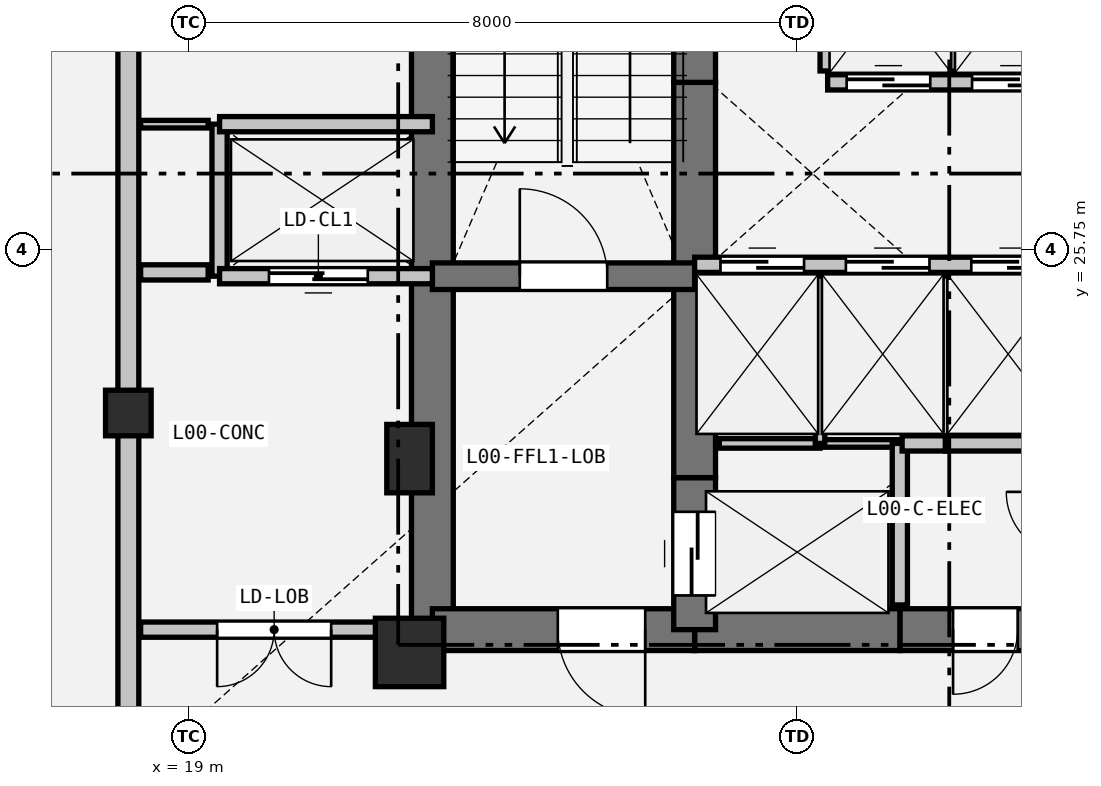
"""IFC4 building model, lengths in metres.
Left out: names, types, materials, properties, quantities, classifications, styles, units other than length and angle.
Written with IfcOpenShell. Run it as: python <this file> out.ifc"""

import sys

from ifc_helpers import new_model, si_unit, direction, frame, frame_2d, origin, origin_2d, place, context, subcontext, project, spatial, rectangle, extrude, element, fill, save


model = new_model("IFC4")
c1 = context("Model", 3, precision=1e-05, world=origin(), true_north=direction((0.0, 1.0)))
c2 = subcontext(c1, "Body", "Model", "MODEL_VIEW")
j1 = project(units=[si_unit("LENGTHUNIT", "METRE"), si_unit("PLANEANGLEUNIT", "RADIAN")], contexts=[c1])
p1 = place(None, origin())
s1 = spatial("IfcSite", under=j1, at=p1, CompositionType="ELEMENT")
p2 = place(p1, origin())
s2 = spatial("IfcBuilding", under=s1, at=p2, CompositionType="ELEMENT")
p3 = place(p2, origin())
s3 = spatial("IfcBuildingStorey", under=s2, at=p3, CompositionType="ELEMENT", Elevation=0.0)
p4 = place(p3, frame((18.2, 23.6, 0.0), z_axis=(0.0, 0.0, 1.0), x_axis=(1.0, 0.0, 0.0)))
e1 = element("IfcColumn", 1, at=p4, inside=s3, PredefinedType="COLUMN", context=c2, shape_type="SweptSolid", body=[
    extrude(rectangle(XDim=0.6, YDim=0.6, at=origin_2d()), origin(), (0.0, 0.0, 1.0), 5.1),
])
p5 = place(p3, frame((21.9, 20.45, 0.0), z_axis=(0.0, 0.0, 1.0), x_axis=(1.0, 0.0, 0.0)))
e2 = element("IfcColumn", 2, at=p5, inside=s3, PredefinedType="COLUMN", context=c2, shape_type="SweptSolid", body=[
    extrude(rectangle(XDim=0.9, YDim=0.9, at=origin_2d()), origin(), (0.0, 0.0, 1.0), 5.1),
])
p6 = place(p3, frame((21.9, 23.0, 0.0), z_axis=(0.0, 0.0, 1.0), x_axis=(1.0, 0.0, 0.0)))
e3 = element("IfcColumn", 3, at=p6, inside=s3, PredefinedType="PILASTER", context=c2, shape_type="SweptSolid", body=[
    extrude(rectangle(XDim=0.6, YDim=0.9, at=origin_2d()), origin(), (0.0, 0.0, 1.0), 5.1),
])
p7 = place(p3, frame((18.2, 18.8, 0.0), z_axis=(0.0, 0.0, 1.0), x_axis=(0.0, 1.0, 0.0)))
e4 = element("IfcWall", 4, at=p7, inside=s3, PredefinedType="SOLIDWALL", context=c2, shape_type="SweptSolid", body=[
    extrude(rectangle(XDim=15.9, YDim=0.275, at=frame_2d((7.95, 0.0))), origin(), (0.0, 0.0, 1.0), 3.185),
])
p8 = place(p7, frame((10.5, 0.0, 0.0)))
e5 = element("IfcOpeningElement", 5, at=p8, cuts=e4, PredefinedType="OPENING", context=c2, shape_type="SweptSolid", body=[
    extrude(rectangle(XDim=1.2, YDim=2.2, at=frame_2d((0.6, 1.1))), frame((0.0, 0.147, 0.0), z_axis=(0.0, -1.0, 0.0), x_axis=(1.0, 0.0, 0.0)), (0.0, 0.0, 1.0), 0.295),
])
p9 = place(p3, frame((22.2, 20.75, 0.0), z_axis=(0.0, 0.0, 1.0), x_axis=(0.0, 1.0, 0.0)))
e6 = element("IfcWall", 6, at=p9, inside=s3, PredefinedType="SHEAR", context=c2, shape_type="SweptSolid", body=[
    extrude(rectangle(XDim=4.65, YDim=0.55, at=frame_2d((2.325, 0.0))), origin(), (0.0, 0.0, 1.0), 4.8),
])
p10 = place(p3, frame((22.2, 25.4, 0.0), z_axis=(0.0, 0.0, 1.0), x_axis=(0.0, 1.0, 0.0)))
e7 = element("IfcWall", 7, at=p10, inside=s3, PredefinedType="SHEAR", context=c2, shape_type="SweptSolid", body=[
    extrude(rectangle(XDim=7.35, YDim=0.55, at=frame_2d((3.675, 0.0))), origin(), (0.0, 0.0, 1.0), 4.8),
])
p11 = place(p3, frame((30.6, 20.75, 0.0), z_axis=(0.0, 0.0, 1.0), x_axis=(-1.0, 0.0, 0.0)))
e8 = element("IfcWall", 8, at=p11, inside=s3, PredefinedType="SHEAR", context=c2, shape_type="SweptSolid", body=[
    extrude(rectangle(XDim=2.25, YDim=0.55, at=frame_2d((1.125, 0.0))), origin(), (0.0, 0.0, 1.0), 4.8),
])
p12 = place(p11, frame((0.7, 0.0, 0.0)))
e9 = element("IfcOpeningElement", 9, at=p12, cuts=e8, PredefinedType="OPENING", context=c2, shape_type="SweptSolid", body=[
    extrude(rectangle(XDim=0.85, YDim=2.1, at=frame_2d((0.425, 1.05))), frame((0.0, 0.285, 0.0), z_axis=(0.0, -1.0, 0.0), x_axis=(1.0, 0.0, 0.0)), (0.0, 0.0, 1.0), 0.57),
])
p13 = place(p3, frame((28.35, 20.75, 0.0), z_axis=(0.0, 0.0, 1.0), x_axis=(-1.0, 0.0, 0.0)))
e10 = element("IfcWall", 10, at=p13, inside=s3, PredefinedType="SHEAR", context=c2, shape_type="SweptSolid", body=[
    extrude(rectangle(XDim=2.7, YDim=0.55, at=frame_2d((1.35, 0.0))), origin(), (0.0, 0.0, 1.0), 4.8),
])
p14 = place(p3, frame((25.65, 20.75, 0.0), z_axis=(0.0, 0.0, 1.0), x_axis=(-1.0, 0.0, 0.0)))
e11 = element("IfcWall", 11, at=p14, inside=s3, PredefinedType="SHEAR", context=c2, shape_type="SweptSolid", body=[
    extrude(rectangle(XDim=3.45, YDim=0.55, at=frame_2d((1.725, 0.0))), origin(), (0.0, 0.0, 1.0), 4.8),
])
p15 = place(p14, frame((0.65, 0.0, 0.0)))
e12 = element("IfcOpeningElement", 12, at=p15, cuts=e11, PredefinedType="OPENING", context=c2, shape_type="SweptSolid", body=[
    extrude(rectangle(XDim=1.15, YDim=2.15, at=frame_2d((0.575, 1.075))), frame((0.0, 0.285, 0.0), z_axis=(0.0, -1.0, 0.0), x_axis=(1.0, 0.0, 0.0)), (0.0, 0.0, 1.0), 0.57),
])
p16 = place(p3, frame((25.65, 20.75, 0.0), z_axis=(0.0, 0.0, 1.0), x_axis=(0.0, 1.0, 0.0)))
e13 = element("IfcWall", 13, at=p16, inside=s3, PredefinedType="SHEAR", context=c2, shape_type="SweptSolid", body=[
    extrude(rectangle(XDim=2.0, YDim=0.55, at=frame_2d((1.0, 0.0))), origin(), (0.0, 0.0, 1.0), 4.8),
])
p17 = place(p16, frame((0.45, 0.0, 0.0)))
e14 = element("IfcOpeningElement", 14, at=p17, cuts=e13, PredefinedType="OPENING", context=c2, shape_type="SweptSolid", body=[
    extrude(rectangle(XDim=1.1, YDim=2.15, at=frame_2d((0.55, 1.075))), frame((0.0, 0.285, 0.0), z_axis=(0.0, -1.0, 0.0), x_axis=(1.0, 0.0, 0.0)), (0.0, 0.0, 1.0), 0.57),
])
p18 = place(p3, frame((25.65, 22.75, 0.0), z_axis=(0.0, 0.0, 1.0), x_axis=(0.0, 1.0, 0.0)))
e15 = element("IfcWall", 15, at=p18, inside=s3, PredefinedType="SHEAR", context=c2, shape_type="SweptSolid", body=[
    extrude(rectangle(XDim=2.8, YDim=0.55, at=frame_2d((1.4, 0.0))), origin(), (0.0, 0.0, 1.0), 4.8),
])
p19 = place(p3, frame((25.65, 25.55, 0.0), z_axis=(0.0, 0.0, 1.0), x_axis=(0.0, 1.0, 0.0)))
e16 = element("IfcWall", 16, at=p19, inside=s3, PredefinedType="SHEAR", context=c2, shape_type="SweptSolid", body=[
    extrude(rectangle(XDim=2.4, YDim=0.55, at=frame_2d((1.2, 0.0))), origin(), (0.0, 0.0, 1.0), 4.8),
])
p20 = place(p3, frame((25.65, 27.95, 0.0), z_axis=(0.0, 0.0, 1.0), x_axis=(0.0, 1.0, 0.0)))
e17 = element("IfcWall", 17, at=p20, inside=s3, PredefinedType="SHEAR", context=c2, shape_type="SweptSolid", body=[
    extrude(rectangle(XDim=4.8, YDim=0.55, at=frame_2d((2.4, 0.0))), origin(), (0.0, 0.0, 1.0), 4.8),
])
p21 = place(p3, frame((22.2, 25.4, 0.0), z_axis=(0.0, 0.0, 1.0), x_axis=(1.0, 0.0, 0.0)))
e18 = element("IfcWall", 18, at=p21, inside=s3, PredefinedType="SHEAR", context=c2, shape_type="SweptSolid", body=[
    extrude(rectangle(XDim=3.45, YDim=0.35, at=frame_2d((1.725, 0.0))), origin(), (0.0, 0.0, 1.0), 4.8),
])
p22 = place(p21, frame((1.15, 0.0, 0.0)))
e19 = element("IfcOpeningElement", 19, at=p22, cuts=e18, PredefinedType="OPENING", context=c2, shape_type="SweptSolid", body=[
    extrude(rectangle(XDim=1.15, YDim=2.15, at=frame_2d((0.575, 1.075))), frame((0.0, 0.185, 0.0), z_axis=(0.0, -1.0, 0.0), x_axis=(1.0, 0.0, 0.0)), (0.0, 0.0, 1.0), 0.37),
])
p23 = place(p3, frame((25.65, 25.55, 0.0), z_axis=(0.0, 0.0, 1.0), x_axis=(1.0, 0.0, 0.0)))
e20 = element("IfcWall", 20, at=p23, inside=s3, PredefinedType="PARTITIONING", context=c2, shape_type="SweptSolid", body=[
    extrude(rectangle(XDim=4.95, YDim=0.2, at=frame_2d((2.475, 0.0))), origin(), (0.0, 0.0, 1.0), 4.8),
])
p24 = place(p23, frame((0.34, 0.0, 0.0)))
e21 = element("IfcOpeningElement", 21, at=p24, cuts=e20, PredefinedType="OPENING", context=c2, shape_type="SweptSolid", body=[
    extrude(rectangle(XDim=1.1, YDim=2.15, at=frame_2d((0.55, 1.075))), frame((0.0, 0.11, 0.0), z_axis=(0.0, -1.0, 0.0), x_axis=(1.0, 0.0, 0.0)), (0.0, 0.0, 1.0), 0.22),
])
p25 = place(p23, frame((1.99, 0.0, 0.0)))
e22 = element("IfcOpeningElement", 22, at=p25, cuts=e20, PredefinedType="OPENING", context=c2, shape_type="SweptSolid", body=[
    extrude(rectangle(XDim=1.1, YDim=2.15, at=frame_2d((0.55, 1.075))), frame((0.0, 0.11, 0.0), z_axis=(0.0, -1.0, 0.0), x_axis=(1.0, 0.0, 0.0)), (0.0, 0.0, 1.0), 0.22),
])
p26 = place(p23, frame((3.64, 0.0, 0.0)))
e23 = element("IfcOpeningElement", 23, at=p26, cuts=e20, PredefinedType="OPENING", context=c2, shape_type="SweptSolid", body=[
    extrude(rectangle(XDim=1.1, YDim=2.15, at=frame_2d((0.55, 1.075))), frame((0.0, 0.11, 0.0), z_axis=(0.0, -1.0, 0.0), x_axis=(1.0, 0.0, 0.0)), (0.0, 0.0, 1.0), 0.22),
])
p27 = place(p3, frame((27.4, 27.95, 0.0), z_axis=(0.0, 0.0, 1.0), x_axis=(1.0, 0.0, 0.0)))
e24 = element("IfcWall", 24, at=p27, inside=s3, PredefinedType="PARTITIONING", context=c2, shape_type="SweptSolid", body=[
    extrude(rectangle(XDim=4.95, YDim=0.2, at=frame_2d((2.475, 0.0))), origin(), (0.0, 0.0, 1.0), 4.8),
])
p28 = place(p27, frame((0.25, 0.0, 0.0)))
e25 = element("IfcOpeningElement", 25, at=p28, cuts=e24, PredefinedType="OPENING", context=c2, shape_type="SweptSolid", body=[
    extrude(rectangle(XDim=1.1, YDim=2.15, at=frame_2d((0.55, 1.075))), frame((0.0, 0.11, 0.0), z_axis=(0.0, -1.0, 0.0), x_axis=(1.0, 0.0, 0.0)), (0.0, 0.0, 1.0), 0.22),
])
p29 = place(p27, frame((1.9, 0.0, 0.0)))
e26 = element("IfcOpeningElement", 26, at=p29, cuts=e24, PredefinedType="OPENING", context=c2, shape_type="SweptSolid", body=[
    extrude(rectangle(XDim=1.1, YDim=2.15, at=frame_2d((0.55, 1.075))), frame((0.0, 0.11, 0.0), z_axis=(0.0, -1.0, 0.0), x_axis=(1.0, 0.0, 0.0)), (0.0, 0.0, 1.0), 0.22),
])
p30 = place(p27, frame((3.55, 0.0, 0.0)))
e27 = element("IfcOpeningElement", 27, at=p30, cuts=e24, PredefinedType="OPENING", context=c2, shape_type="SweptSolid", body=[
    extrude(rectangle(XDim=1.1, YDim=2.15, at=frame_2d((0.55, 1.075))), frame((0.0, 0.11, 0.0), z_axis=(0.0, -1.0, 0.0), x_axis=(1.0, 0.0, 0.0)), (0.0, 0.0, 1.0), 0.22),
])
p31 = place(p3, frame((19.4, 25.4, 0.0), z_axis=(0.0, 0.0, 1.0), x_axis=(0.0, 1.0, 0.0)))
e28 = element("IfcWall", 28, at=p31, inside=s3, PredefinedType="PARTITIONING", context=c2, shape_type="SweptSolid", body=[
    extrude(rectangle(XDim=2.0, YDim=0.2, at=frame_2d((1.0, 0.0))), origin(), (0.0, 0.0, 1.0), 3.185),
])
p32 = place(p3, frame((19.4, 27.4, 0.0), z_axis=(0.0, 0.0, 1.0), x_axis=(1.0, 0.0, 0.0)))
e29 = element("IfcWall", 29, at=p32, inside=s3, PredefinedType="PARTITIONING", context=c2, shape_type="SweptSolid", body=[
    extrude(rectangle(XDim=2.8, YDim=0.2, at=frame_2d((1.4, 0.0))), origin(), (0.0, 0.0, 1.0), 4.8),
])
p33 = place(p3, frame((22.2, 25.4, 0.0), z_axis=(0.0, 0.0, 1.0), x_axis=(-1.0, 0.0, 0.0)))
e30 = element("IfcWall", 30, at=p33, inside=s3, PredefinedType="PARTITIONING", context=c2, shape_type="SweptSolid", body=[
    extrude(rectangle(XDim=2.8, YDim=0.2, at=frame_2d((1.4, 0.0))), origin(), (0.0, 0.0, 1.0), 3.185),
])
p34 = place(p33, frame((0.85, 0.0, 0.0)))
e31 = element("IfcOpeningElement", 31, at=p34, cuts=e30, PredefinedType="OPENING", context=c2, shape_type="SweptSolid", body=[
    extrude(rectangle(XDim=1.3, YDim=2.2, at=frame_2d((0.65, 1.1))), frame((0.0, 0.11, 0.0), z_axis=(0.0, -1.0, 0.0), x_axis=(1.0, 0.0, 0.0)), (0.0, 0.0, 1.0), 0.22),
])
p35 = place(p3, frame((25.975, 23.2, 0.0), z_axis=(0.0, 0.0, 1.0), x_axis=(1.0, 0.0, 0.0)))
e32 = element("IfcWall", 32, at=p35, inside=s3, PredefinedType="PARTITIONING", context=c2, shape_type="SweptSolid", body=[
    extrude(rectangle(XDim=1.325, YDim=0.125, at=frame_2d((0.663, 0.0))), origin(), (0.0, 0.0, 1.0), 4.8),
])
p36 = place(p3, frame((27.3, 23.2, 0.0), z_axis=(0.0, 0.0, 1.0), x_axis=(1.0, 0.0, 0.0)))
e33 = element("IfcWall", 33, at=p36, inside=s3, PredefinedType="PARTITIONING", context=c2, shape_type="SweptSolid", body=[
    extrude(rectangle(XDim=1.05, YDim=0.1, at=frame_2d((0.525, 0.0))), origin(), (0.0, 0.0, 1.0), 4.8),
])
p37 = place(p3, frame((28.35, 23.2, 0.0), z_axis=(0.0, 0.0, 1.0), x_axis=(0.0, -1.0, 0.0)))
e34 = element("IfcWall", 34, at=p37, inside=s3, PredefinedType="PARTITIONING", context=c2, shape_type="SweptSolid", body=[
    extrude(rectangle(XDim=2.125, YDim=0.2, at=frame_2d((1.062, 0.0))), origin(), (0.0, 0.0, 1.0), 4.8),
])
p38 = place(p3, frame((27.3, 25.4, 0.0), z_axis=(0.0, 0.0, 1.0), x_axis=(0.0, -1.0, 0.0)))
e35 = element("IfcWall", 35, at=p38, inside=s3, PredefinedType="PARTITIONING", context=c2, shape_type="SweptSolid", body=[
    extrude(rectangle(XDim=2.2, YDim=0.125, at=frame_2d((1.1, 0.0))), origin(), (0.0, 0.0, 1.0), 4.8),
])
p39 = place(p3, frame((28.95, 25.4, 0.0), z_axis=(0.0, 0.0, 1.0), x_axis=(0.0, -1.0, 0.0)))
e36 = element("IfcWall", 36, at=p39, inside=s3, PredefinedType="PARTITIONING", context=c2, shape_type="SweptSolid", body=[
    extrude(rectangle(XDim=2.2, YDim=0.1, at=frame_2d((1.1, 0.0))), origin(), (0.0, 0.0, 1.0), 4.8),
])
p40 = place(p3, frame((28.95, 23.2, 0.0), z_axis=(0.0, 0.0, 1.0), x_axis=(-1.0, 0.0, 0.0)))
e37 = element("IfcWall", 37, at=p40, inside=s3, PredefinedType="PARTITIONING", context=c2, shape_type="SweptSolid", body=[
    extrude(rectangle(XDim=0.57, YDim=0.2, at=frame_2d((0.285, 0.0))), origin(), (0.0, 0.0, 1.0), 4.8),
])
p41 = place(p3, frame((30.6, 23.2, 0.0), z_axis=(0.0, 0.0, 1.0), x_axis=(-1.0, 0.0, 0.0)))
e38 = element("IfcWall", 38, at=p41, inside=s3, PredefinedType="PARTITIONING", context=c2, shape_type="SweptSolid", body=[
    extrude(rectangle(XDim=1.65, YDim=0.2, at=frame_2d((0.825, 0.0))), origin(), (0.0, 0.0, 1.0), 4.8),
])
p42 = place(p3, frame((29.05, 30.3, 0.0), z_axis=(0.0, 0.0, 1.0), x_axis=(0.0, -1.0, 0.0)))
e39 = element("IfcWall", 39, at=p42, inside=s3, PredefinedType="PARTITIONING", context=c2, shape_type="SweptSolid", body=[
    extrude(rectangle(XDim=2.2, YDim=0.125, at=frame_2d((1.1, 0.0))), origin(), (0.0, 0.0, 1.0), 4.8),
])
p43 = place(p3, frame((27.4, 28.1, 0.0), z_axis=(0.0, 0.0, 1.0), x_axis=(0.0, 1.0, 0.0)))
e40 = element("IfcWall", 40, at=p43, inside=s3, PredefinedType="PARTITIONING", context=c2, shape_type="SweptSolid", body=[
    extrude(rectangle(XDim=2.2, YDim=0.2, at=frame_2d((1.1, 0.0))), origin(), (0.0, 0.0, 1.0), 4.8),
])
p44 = place(p3, frame((18.362, 25.45, 0.0), z_axis=(0.0, 0.0, 1.0), x_axis=(1.0, 0.0, 0.0)))
e41 = element("IfcWall", 41, at=p44, inside=s3, PredefinedType="PARTITIONING", context=c2, shape_type="SweptSolid", body=[
    extrude(rectangle(XDim=0.888, YDim=0.2, at=frame_2d((0.444, 0.0))), origin(), (0.0, 0.0, 1.0), 3.185),
])
p45 = place(p3, frame((21.875, 20.75, 0.0), z_axis=(0.0, 0.0, 1.0), x_axis=(-1.0, 0.0, 0.0)))
e42 = element("IfcWall", 42, at=p45, inside=s3, PredefinedType="PARTITIONING", context=c2, shape_type="SweptSolid", body=[
    extrude(rectangle(XDim=3.513, YDim=0.2, at=frame_2d((1.757, 0.0))), origin(), (0.0, 0.0, 1.0), 4.8),
])
p46 = place(p45, frame((1.007, 0.0, 0.0)))
e43 = element("IfcOpeningElement", 43, at=p46, cuts=e42, PredefinedType="OPENING", context=c2, shape_type="SweptSolid", body=[
    extrude(rectangle(XDim=1.5, YDim=2.2, at=frame_2d((0.75, 1.1))), frame((0.0, 0.11, 0.0), z_axis=(0.0, -1.0, 0.0), x_axis=(1.0, 0.0, 0.0)), (0.0, 0.0, 1.0), 0.22),
])
p47 = place(p3, frame((19.25, 27.4, 0.0), z_axis=(0.0, 0.0, 1.0), x_axis=(-1.0, 0.0, 0.0)))
e44 = element("IfcWall", 44, at=p47, inside=s3, PredefinedType="PARTITIONING", context=c2, shape_type="SweptSolid", body=[
    extrude(rectangle(XDim=0.888, YDim=0.1, at=frame_2d((0.444, 0.0))), origin(), (0.0, 0.0, 1.0), 3.185),
])
p48 = place(p24, origin())
e45 = element("IfcDoor", 45, at=p48, inside=s3, OperationType="SLIDING_TO_LEFT", PredefinedType="DOOR", context=c2, shape_type="SweptSolid", body=[
    extrude(rectangle(XDim=1.1, YDim=2.15, at=frame_2d((0.55, 1.075))), frame((0.0, 0.025, 0.0), z_axis=(0.0, -1.0, 0.0), x_axis=(1.0, 0.0, 0.0)), (0.0, 0.0, 1.0), 0.05),
])
fill(e21, e45)
p49 = place(p25, origin())
e46 = element("IfcDoor", 46, at=p49, inside=s3, OperationType="SLIDING_TO_LEFT", PredefinedType="DOOR", context=c2, shape_type="SweptSolid", body=[
    extrude(rectangle(XDim=1.1, YDim=2.15, at=frame_2d((0.55, 1.075))), frame((0.0, 0.025, 0.0), z_axis=(0.0, -1.0, 0.0), x_axis=(1.0, 0.0, 0.0)), (0.0, 0.0, 1.0), 0.05),
])
fill(e22, e46)
p50 = place(p26, origin())
e47 = element("IfcDoor", 47, at=p50, inside=s3, OperationType="SLIDING_TO_LEFT", PredefinedType="DOOR", context=c2, shape_type="SweptSolid", body=[
    extrude(rectangle(XDim=1.1, YDim=2.15, at=frame_2d((0.55, 1.075))), frame((0.0, 0.025, 0.0), z_axis=(0.0, -1.0, 0.0), x_axis=(1.0, 0.0, 0.0)), (0.0, 0.0, 1.0), 0.05),
])
fill(e23, e47)
p51 = place(p28, origin())
e48 = element("IfcDoor", 48, at=p51, inside=s3, OperationType="SLIDING_TO_LEFT", PredefinedType="DOOR", context=c2, shape_type="SweptSolid", body=[
    extrude(rectangle(XDim=1.1, YDim=2.15, at=frame_2d((0.55, 1.075))), frame((0.0, 0.025, 0.0), z_axis=(0.0, -1.0, 0.0), x_axis=(1.0, 0.0, 0.0)), (0.0, 0.0, 1.0), 0.05),
])
fill(e25, e48)
p52 = place(p29, origin())
e49 = element("IfcDoor", 49, at=p52, inside=s3, OperationType="SLIDING_TO_LEFT", PredefinedType="DOOR", context=c2, shape_type="SweptSolid", body=[
    extrude(rectangle(XDim=1.1, YDim=2.15, at=frame_2d((0.55, 1.075))), frame((0.0, 0.025, 0.0), z_axis=(0.0, -1.0, 0.0), x_axis=(1.0, 0.0, 0.0)), (0.0, 0.0, 1.0), 0.05),
])
fill(e26, e49)
p53 = place(p17, origin())
e50 = element("IfcDoor", 50, at=p53, inside=s3, OperationType="SLIDING_TO_LEFT", PredefinedType="DOOR", context=c2, shape_type="SweptSolid", body=[
    extrude(rectangle(XDim=1.1, YDim=2.15, at=frame_2d((0.55, 1.075))), frame((0.0, 0.025, 0.0), z_axis=(0.0, -1.0, 0.0), x_axis=(1.0, 0.0, 0.0)), (0.0, 0.0, 1.0), 0.05),
])
fill(e14, e50)
p54 = place(p34, origin())
e51 = element("IfcDoor", 51, at=p54, inside=s3, OperationType="SLIDING_TO_LEFT", PredefinedType="DOOR", context=c2, shape_type="SweptSolid", body=[
    extrude(rectangle(XDim=1.3, YDim=2.2, at=frame_2d((0.65, 1.1))), frame((0.0, 0.025, 0.0), z_axis=(0.0, -1.0, 0.0), x_axis=(1.0, 0.0, 0.0)), (0.0, 0.0, 1.0), 0.05),
])
fill(e31, e51)
p55 = place(p22, origin())
e52 = element("IfcDoor", 52, at=p55, inside=s3, OperationType="SINGLE_SWING_LEFT", PredefinedType="DOOR", context=c2, shape_type="SweptSolid", body=[
    extrude(rectangle(XDim=1.15, YDim=2.15, at=frame_2d((0.575, 1.075))), frame((0.0, 0.025, 0.0), z_axis=(0.0, -1.0, 0.0), x_axis=(1.0, 0.0, 0.0)), (0.0, 0.0, 1.0), 0.05),
])
fill(e19, e52)
p56 = place(p15, origin())
e53 = element("IfcDoor", 53, at=p56, inside=s3, OperationType="SINGLE_SWING_LEFT", PredefinedType="DOOR", context=c2, shape_type="SweptSolid", body=[
    extrude(rectangle(XDim=1.15, YDim=2.15, at=frame_2d((0.575, 1.075))), frame((0.0, 0.025, 0.0), z_axis=(0.0, -1.0, 0.0), x_axis=(1.0, 0.0, 0.0)), (0.0, 0.0, 1.0), 0.05),
])
fill(e12, e53)
p57 = place(p46, origin())
e54 = element("IfcDoor", 54, at=p57, inside=s3, OperationType="DOUBLE_DOOR_SINGLE_SWING", PredefinedType="DOOR", context=c2, shape_type="SweptSolid", body=[
    extrude(rectangle(XDim=1.5, YDim=2.2, at=frame_2d((0.75, 1.1))), frame((0.0, 0.025, 0.0), z_axis=(0.0, -1.0, 0.0), x_axis=(1.0, 0.0, 0.0)), (0.0, 0.0, 1.0), 0.05),
])
fill(e43, e54)
p58 = place(p12, origin())
e55 = element("IfcDoor", 55, at=p58, inside=s3, OperationType="SINGLE_SWING_RIGHT", PredefinedType="DOOR", context=c2, shape_type="SweptSolid", body=[
    extrude(rectangle(XDim=0.85, YDim=2.1, at=frame_2d((0.425, 1.05))), frame((0.0, 0.025, 0.0), z_axis=(0.0, -1.0, 0.0), x_axis=(1.0, 0.0, 0.0)), (0.0, 0.0, 1.0), 0.05),
])
fill(e9, e55)
save(model, sys.argv[1])
